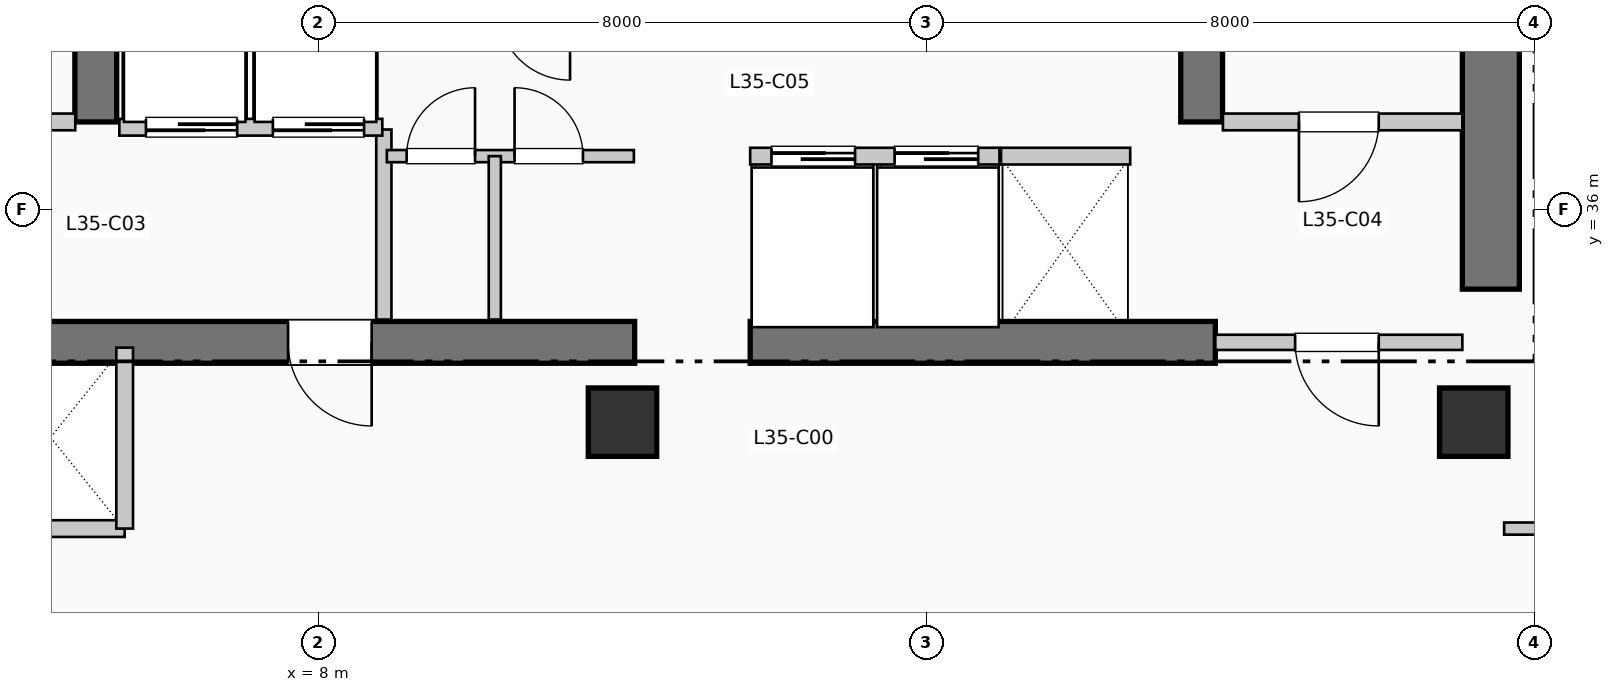
"""IFC4 building model, lengths in metres.
Left out: names, types, materials, properties, quantities, classifications, styles, units other than length and angle.
Written with IfcOpenShell. Run it as: python <this file> out.ifc"""

import sys

from ifc_helpers import new_model, si_unit, direction, frame, frame_2d, origin, origin_2d, place, context, subcontext, project, spatial, rectangle, extrude, element, fill, save


model = new_model("IFC4")
c1 = context("Model", 3, precision=1e-05, world=origin(), true_north=direction((0.0, 1.0)))
c2 = subcontext(c1, "Body", "Model", "MODEL_VIEW")
j1 = project(units=[si_unit("LENGTHUNIT", "METRE"), si_unit("PLANEANGLEUNIT", "RADIAN")], contexts=[c1])
p1 = place(None, origin())
s1 = spatial("IfcSite", under=j1, at=p1, CompositionType="ELEMENT")
p2 = place(p1, origin())
s2 = spatial("IfcBuilding", under=s1, at=p2, CompositionType="ELEMENT")
p3 = place(p2, frame((0.0, 0.0, 146.85)))
s3 = spatial("IfcBuildingStorey", under=s2, at=p3, CompositionType="ELEMENT", Elevation=146.85)
p4 = place(p3, frame((23.425, 34.95, 0.0), z_axis=(0.0, 0.0, 1.0), x_axis=(0.0, 1.0, 0.0)))
e1 = element("IfcWall", 1, at=p4, inside=s3, PredefinedType="SHEAR", context=c2, shape_type="SweptSolid", body=[
    extrude(rectangle(XDim=10.64, YDim=0.75, at=frame_2d((5.32, 0.0))), origin(), (0.0, 0.0, 1.0), 3.96),
])
p5 = place(p3, frame((1.45, 34.25, 0.0), z_axis=(0.0, 0.0, 1.0), x_axis=(1.0, 0.0, 0.0)))
e2 = element("IfcWall", 2, at=p5, inside=s3, PredefinedType="SHEAR", context=c2, shape_type="SweptSolid", body=[
    extrude(rectangle(XDim=10.71, YDim=0.55, at=frame_2d((5.355, 0.0))), origin(), (0.0, 0.0, 1.0), 3.96),
])
p6 = place(p5, frame((7.25, 0.0, 0.0), z_axis=(0.0, 0.0, 1.0), x_axis=(-1.0, 0.0, 0.0)))
e3 = element("IfcOpeningElement", 3, at=p6, cuts=e2, PredefinedType="OPENING", context=c2, shape_type="SweptSolid", body=[
    extrude(rectangle(XDim=1.1, YDim=2.15, at=frame_2d((0.55, 1.075))), frame((0.0, 0.285, 0.0), z_axis=(0.0, -1.0, 0.0), x_axis=(1.0, 0.0, 0.0)), (0.0, 0.0, 1.0), 0.57),
])
p7 = place(p3, frame((13.68, 34.25, 0.0), z_axis=(0.0, 0.0, 1.0), x_axis=(1.0, 0.0, 0.0)))
e4 = element("IfcWall", 4, at=p7, inside=s3, PredefinedType="SHEAR", context=c2, shape_type="SweptSolid", body=[
    extrude(rectangle(XDim=6.12, YDim=0.55, at=frame_2d((3.06, 0.0))), origin(), (0.0, 0.0, 1.0), 3.96),
])
for number, where, z_axis, x_axis in (
    (5, (5.07, 37.15, 0.0), (0.0, 0.0, 1.0), (0.0, 1.0, 0.0)),
    (6, (19.62, 37.15, 0.0), (0.0, 0.0, 1.0), (0.0, 1.0, 0.0)),
):
    element("IfcWall", number, at=place(p3, frame(where, z_axis=z_axis, x_axis=x_axis)), inside=s3, PredefinedType="SHEAR", context=c2, shape_type="SweptSolid", body=[
        extrude(rectangle(XDim=7.89, YDim=0.55, at=frame_2d((3.945, 0.0))), origin(), (0.0, 0.0, 1.0), 3.96),
    ])
for number, where, z_axis, x_axis in (
    (7, (12.0, 33.2, 0.0), (0.0, 0.0, 1.0), (1.0, 0.0, 0.0)),
    (8, (23.2, 33.2, 0.0), (0.0, 0.0, 1.0), (1.0, 0.0, 0.0)),
):
    element("IfcColumn", number, at=place(p3, frame(where, z_axis=z_axis, x_axis=x_axis)), inside=s3, PredefinedType="COLUMN", context=c2, shape_type="SweptSolid", body=[
        extrude(rectangle(XDim=0.9, YDim=0.9, at=origin_2d()), origin(), (0.0, 0.0, 1.0), 3.96),
    ])
p8 = place(p3, frame((1.65, 37.15, 0.0), z_axis=(0.0, 0.0, 1.0), x_axis=(1.0, 0.0, 0.0)))
e9 = element("IfcWall", 9, at=p8, inside=s3, PredefinedType="PARTITIONING", context=c2, shape_type="SweptSolid", body=[
    extrude(rectangle(XDim=3.15, YDim=0.22, at=frame_2d((1.575, 0.0))), origin(), (0.0, 0.0, 1.0), 3.71),
])
p9 = place(p8, frame((2.05, 0.0, 0.0), z_axis=(0.0, 0.0, 1.0), x_axis=(-1.0, 0.0, 0.0)))
e10 = element("IfcOpeningElement", 10, at=p9, cuts=e9, PredefinedType="OPENING", context=c2, shape_type="SweptSolid", body=[
    extrude(rectangle(XDim=1.05, YDim=2.15, at=frame_2d((0.525, 1.075))), frame((0.0, 0.12, 0.0), z_axis=(0.0, -1.0, 0.0), x_axis=(1.0, 0.0, 0.0)), (0.0, 0.0, 1.0), 0.24),
])
p10 = place(p3, frame((8.86, 34.55, 0.0), z_axis=(0.0, 0.0, 1.0), x_axis=(0.0, 1.0, 0.0)))
e11 = element("IfcWall", 11, at=p10, inside=s3, PredefinedType="PARTITIONING", context=c2, shape_type="SweptSolid", body=[
    extrude(rectangle(XDim=2.5, YDim=0.2, at=frame_2d((1.25, 0.0))), origin(), (0.0, 0.0, 1.0), 3.71),
])
p11 = place(p3, frame((19.9, 37.15, 0.0), z_axis=(0.0, 0.0, 1.0), x_axis=(1.0, 0.0, 0.0)))
e12 = element("IfcWall", 12, at=p11, inside=s3, PredefinedType="PARTITIONING", context=c2, shape_type="SweptSolid", body=[
    extrude(rectangle(XDim=3.15, YDim=0.22, at=frame_2d((1.575, 0.0))), origin(), (0.0, 0.0, 1.0), 3.71),
])
p12 = place(p11, frame((2.05, 0.0, 0.0), z_axis=(0.0, 0.0, 1.0), x_axis=(-1.0, 0.0, 0.0)))
e13 = element("IfcOpeningElement", 13, at=p12, cuts=e12, PredefinedType="OPENING", context=c2, shape_type="SweptSolid", body=[
    extrude(rectangle(XDim=1.05, YDim=2.15, at=frame_2d((0.525, 1.075))), frame((0.0, 0.12, 0.0), z_axis=(0.0, -1.0, 0.0), x_axis=(1.0, 0.0, 0.0)), (0.0, 0.0, 1.0), 0.24),
])
p13 = place(p3, frame((19.8, 34.25, 0.0), z_axis=(0.0, 0.0, 1.0), x_axis=(1.0, 0.0, 0.0)))
e14 = element("IfcWall", 14, at=p13, inside=s3, PredefinedType="PARTITIONING", context=c2, shape_type="SweptSolid", body=[
    extrude(rectangle(XDim=3.25, YDim=0.2, at=frame_2d((1.625, 0.0))), origin(), (0.0, 0.0, 1.0), 3.71),
])
p14 = place(p13, frame((2.15, 0.0, 0.0), z_axis=(0.0, 0.0, 1.0), x_axis=(-1.0, 0.0, 0.0)))
e15 = element("IfcOpeningElement", 15, at=p14, cuts=e14, PredefinedType="OPENING", context=c2, shape_type="SweptSolid", body=[
    extrude(rectangle(XDim=1.1, YDim=2.15, at=frame_2d((0.55, 1.075))), frame((0.0, 0.11, 0.0), z_axis=(0.0, -1.0, 0.0), x_axis=(1.0, 0.0, 0.0)), (0.0, 0.0, 1.0), 0.22),
])
p15 = place(p3, frame((5.38, 37.08, 0.0), z_axis=(0.0, 0.0, 1.0), x_axis=(1.0, 0.0, 0.0)))
e16 = element("IfcWall", 16, at=p15, inside=s3, PredefinedType="PARTITIONING", context=c2, shape_type="SweptSolid", body=[
    extrude(rectangle(XDim=3.46, YDim=0.22, at=frame_2d((1.73, 0.0))), origin(), (0.0, 0.0, 1.0), 3.71),
])
p16 = place(p15, frame((1.55, 0.0, 0.0), z_axis=(0.0, 0.0, 1.0), x_axis=(-1.0, 0.0, 0.0)))
e17 = element("IfcOpeningElement", 17, at=p16, cuts=e16, PredefinedType="OPENING", context=c2, shape_type="SweptSolid", body=[
    extrude(rectangle(XDim=1.2, YDim=2.2, at=frame_2d((0.6, 1.1))), frame((0.0, 0.12, 0.0), z_axis=(0.0, -1.0, 0.0), x_axis=(1.0, 0.0, 0.0)), (0.0, 0.0, 1.0), 0.24),
])
p17 = place(p15, frame((3.22, 0.0, 0.0), z_axis=(0.0, 0.0, 1.0), x_axis=(-1.0, 0.0, 0.0)))
e18 = element("IfcOpeningElement", 18, at=p17, cuts=e16, PredefinedType="OPENING", context=c2, shape_type="SweptSolid", body=[
    extrude(rectangle(XDim=1.2, YDim=2.2, at=frame_2d((0.6, 1.1))), frame((0.0, 0.12, 0.0), z_axis=(0.0, -1.0, 0.0), x_axis=(1.0, 0.0, 0.0)), (0.0, 0.0, 1.0), 0.24),
])
p18 = place(p3, frame((1.55, 31.8, 0.0), z_axis=(0.0, 0.0, 1.0), x_axis=(1.0, 0.0, 0.0)))
e19 = element("IfcWall", 19, at=p18, inside=s3, PredefinedType="PARTITIONING", context=c2, shape_type="SweptSolid", body=[
    extrude(rectangle(XDim=3.9, YDim=0.22, at=frame_2d((1.95, 0.0))), origin(), (0.0, 0.0, 1.0), 3.71),
])
p19 = place(p3, frame((5.45, 31.8, 0.0), z_axis=(0.0, 0.0, 1.0), x_axis=(0.0, 1.0, 0.0)))
e20 = element("IfcWall", 20, at=p19, inside=s3, PredefinedType="PARTITIONING", context=c2, shape_type="SweptSolid", body=[
    extrude(rectangle(XDim=2.38, YDim=0.22, at=frame_2d((1.19, 0.0))), origin(), (0.0, 0.0, 1.0), 3.71),
])
p20 = place(p3, frame((8.9, 36.7, 0.0), z_axis=(0.0, 0.0, 1.0), x_axis=(1.0, 0.0, 0.0)))
e21 = element("IfcWall", 21, at=p20, inside=s3, PredefinedType="PARTITIONING", context=c2, shape_type="SweptSolid", body=[
    extrude(rectangle(XDim=3.25, YDim=0.16, at=frame_2d((1.625, 0.0))), origin(), (0.0, 0.0, 1.0), 3.71),
])
p21 = place(p20, frame((0.26, 0.0, 0.0)))
e22 = element("IfcOpeningElement", 22, at=p21, cuts=e21, PredefinedType="OPENING", context=c2, shape_type="SweptSolid", body=[
    extrude(rectangle(XDim=0.9, YDim=2.15, at=frame_2d((0.45, 1.075))), frame((0.0, 0.09, 0.0), z_axis=(0.0, -1.0, 0.0), x_axis=(1.0, 0.0, 0.0)), (0.0, 0.0, 1.0), 0.18),
])
p22 = place(p20, frame((1.68, 0.0, 0.0)))
e23 = element("IfcOpeningElement", 23, at=p22, cuts=e21, PredefinedType="OPENING", context=c2, shape_type="SweptSolid", body=[
    extrude(rectangle(XDim=0.9, YDim=2.15, at=frame_2d((0.45, 1.075))), frame((0.0, 0.09, 0.0), z_axis=(0.0, -1.0, 0.0), x_axis=(1.0, 0.0, 0.0)), (0.0, 0.0, 1.0), 0.18),
])
p23 = place(p3, frame((10.32, 34.55, 0.0), z_axis=(0.0, 0.0, 1.0), x_axis=(0.0, 1.0, 0.0)))
e24 = element("IfcWall", 24, at=p23, inside=s3, PredefinedType="PARTITIONING", context=c2, shape_type="SweptSolid", body=[
    extrude(rectangle(XDim=2.15, YDim=0.16, at=frame_2d((1.075, 0.0))), origin(), (0.0, 0.0, 1.0), 3.71),
])
p24 = place(p3, frame((13.68, 36.7, 0.0), z_axis=(0.0, 0.0, 1.0), x_axis=(1.0, 0.0, 0.0)))
e25 = element("IfcWall", 25, at=p24, inside=s3, PredefinedType="PARTITIONING", context=c2, shape_type="SweptSolid", body=[
    extrude(rectangle(XDim=3.28, YDim=0.22, at=frame_2d((1.64, 0.0))), origin(), (0.0, 0.0, 1.0), 3.71),
])
p25 = place(p24, frame((0.28, 0.0, 0.0)))
e26 = element("IfcOpeningElement", 26, at=p25, cuts=e25, PredefinedType="OPENING", context=c2, shape_type="SweptSolid", body=[
    extrude(rectangle(XDim=1.1, YDim=2.2, at=frame_2d((0.55, 1.1))), frame((0.0, 0.12, 0.0), z_axis=(0.0, -1.0, 0.0), x_axis=(1.0, 0.0, 0.0)), (0.0, 0.0, 1.0), 0.24),
])
p26 = place(p24, frame((1.9, 0.0, 0.0)))
e27 = element("IfcOpeningElement", 27, at=p26, cuts=e25, PredefinedType="OPENING", context=c2, shape_type="SweptSolid", body=[
    extrude(rectangle(XDim=1.1, YDim=2.2, at=frame_2d((0.55, 1.1))), frame((0.0, 0.12, 0.0), z_axis=(0.0, -1.0, 0.0), x_axis=(1.0, 0.0, 0.0)), (0.0, 0.0, 1.0), 0.24),
])
p27 = place(p3, frame((16.98, 36.7, 0.0), z_axis=(0.0, 0.0, 1.0), x_axis=(1.0, 0.0, 0.0)))
e28 = element("IfcWall", 28, at=p27, inside=s3, PredefinedType="PARTITIONING", context=c2, shape_type="SweptSolid", body=[
    extrude(rectangle(XDim=1.7, YDim=0.22, at=frame_2d((0.85, 0.0))), origin(), (0.0, 0.0, 1.0), 3.71),
])
p28 = place(p3, frame((23.6, 31.8, 0.0), z_axis=(0.0, 0.0, 1.0), x_axis=(1.0, 0.0, 0.0)))
e29 = element("IfcWall", 29, at=p28, inside=s3, PredefinedType="PARTITIONING", context=c2, shape_type="SweptSolid", body=[
    extrude(rectangle(XDim=26.41, YDim=0.16, at=frame_2d((13.205, 0.0))), origin(), (0.0, 0.0, 1.0), 3.71),
])
p29 = place(p28, frame((6.156, 0.0, 0.0)))
e30 = element("IfcOpeningElement", 30, at=p29, cuts=e29, PredefinedType="OPENING", context=c2, shape_type="SweptSolid", body=[
    extrude(rectangle(XDim=0.95, YDim=2.15, at=frame_2d((0.475, 1.075))), frame((0.0, 0.09, 0.0), z_axis=(0.0, -1.0, 0.0), x_axis=(1.0, 0.0, 0.0)), (0.0, 0.0, 1.0), 0.18),
])
p30 = place(p28, frame((19.861, 0.0, 0.0)))
e31 = element("IfcOpeningElement", 31, at=p30, cuts=e29, PredefinedType="OPENING", context=c2, shape_type="SweptSolid", body=[
    extrude(rectangle(XDim=0.95, YDim=2.15, at=frame_2d((0.475, 1.075))), frame((0.0, 0.09, 0.0), z_axis=(0.0, -1.0, 0.0), x_axis=(1.0, 0.0, 0.0)), (0.0, 0.0, 1.0), 0.18),
])
p31 = place(p6, origin())
e32 = element("IfcDoor", 32, at=p31, inside=s3, OperationType="SINGLE_SWING_RIGHT", PredefinedType="DOOR", context=c2, shape_type="SweptSolid", body=[
    extrude(rectangle(XDim=1.1, YDim=2.15, at=frame_2d((0.55, 1.075))), frame((0.0, 0.025, 0.0), z_axis=(0.0, -1.0, 0.0), x_axis=(1.0, 0.0, 0.0)), (0.0, 0.0, 1.0), 0.05),
])
fill(e3, e32)
p32 = place(p12, origin())
e33 = element("IfcDoor", 33, at=p32, inside=s3, OperationType="SINGLE_SWING_LEFT", PredefinedType="DOOR", context=c2, shape_type="SweptSolid", body=[
    extrude(rectangle(XDim=1.05, YDim=2.15, at=frame_2d((0.525, 1.075))), frame((0.0, 0.025, 0.0), z_axis=(0.0, -1.0, 0.0), x_axis=(1.0, 0.0, 0.0)), (0.0, 0.0, 1.0), 0.05),
])
fill(e13, e33)
p33 = place(p14, origin())
e34 = element("IfcDoor", 34, at=p33, inside=s3, OperationType="SINGLE_SWING_RIGHT", PredefinedType="DOOR", context=c2, shape_type="SweptSolid", body=[
    extrude(rectangle(XDim=1.1, YDim=2.15, at=frame_2d((0.55, 1.075))), frame((0.0, 0.025, 0.0), z_axis=(0.0, -1.0, 0.0), x_axis=(1.0, 0.0, 0.0)), (0.0, 0.0, 1.0), 0.05),
])
fill(e15, e34)
p34 = place(p16, origin())
e35 = element("IfcDoor", 35, at=p34, inside=s3, OperationType="SLIDING_TO_RIGHT", PredefinedType="DOOR", context=c2, shape_type="SweptSolid", body=[
    extrude(rectangle(XDim=1.2, YDim=2.2, at=frame_2d((0.6, 1.1))), frame((0.0, 0.025, 0.0), z_axis=(0.0, -1.0, 0.0), x_axis=(1.0, 0.0, 0.0)), (0.0, 0.0, 1.0), 0.05),
])
fill(e17, e35)
p35 = place(p17, origin())
e36 = element("IfcDoor", 36, at=p35, inside=s3, OperationType="SLIDING_TO_RIGHT", PredefinedType="DOOR", context=c2, shape_type="SweptSolid", body=[
    extrude(rectangle(XDim=1.2, YDim=2.2, at=frame_2d((0.6, 1.1))), frame((0.0, 0.025, 0.0), z_axis=(0.0, -1.0, 0.0), x_axis=(1.0, 0.0, 0.0)), (0.0, 0.0, 1.0), 0.05),
])
fill(e18, e36)
p36 = place(p21, origin())
e37 = element("IfcDoor", 37, at=p36, inside=s3, OperationType="SINGLE_SWING_RIGHT", PredefinedType="DOOR", context=c2, shape_type="SweptSolid", body=[
    extrude(rectangle(XDim=0.9, YDim=2.15, at=frame_2d((0.45, 1.075))), frame((0.0, 0.025, 0.0), z_axis=(0.0, -1.0, 0.0), x_axis=(1.0, 0.0, 0.0)), (0.0, 0.0, 1.0), 0.05),
])
fill(e22, e37)
p37 = place(p22, origin())
e38 = element("IfcDoor", 38, at=p37, inside=s3, OperationType="SINGLE_SWING_LEFT", PredefinedType="DOOR", context=c2, shape_type="SweptSolid", body=[
    extrude(rectangle(XDim=0.9, YDim=2.15, at=frame_2d((0.45, 1.075))), frame((0.0, 0.025, 0.0), z_axis=(0.0, -1.0, 0.0), x_axis=(1.0, 0.0, 0.0)), (0.0, 0.0, 1.0), 0.05),
])
fill(e23, e38)
p38 = place(p25, origin())
e39 = element("IfcDoor", 39, at=p38, inside=s3, OperationType="SLIDING_TO_RIGHT", PredefinedType="DOOR", context=c2, shape_type="SweptSolid", body=[
    extrude(rectangle(XDim=1.1, YDim=2.2, at=frame_2d((0.55, 1.1))), frame((0.0, 0.025, 0.0), z_axis=(0.0, -1.0, 0.0), x_axis=(1.0, 0.0, 0.0)), (0.0, 0.0, 1.0), 0.05),
])
fill(e26, e39)
p39 = place(p26, origin())
e40 = element("IfcDoor", 40, at=p39, inside=s3, OperationType="SLIDING_TO_RIGHT", PredefinedType="DOOR", context=c2, shape_type="SweptSolid", body=[
    extrude(rectangle(XDim=1.1, YDim=2.2, at=frame_2d((0.55, 1.1))), frame((0.0, 0.025, 0.0), z_axis=(0.0, -1.0, 0.0), x_axis=(1.0, 0.0, 0.0)), (0.0, 0.0, 1.0), 0.05),
])
fill(e27, e40)
save(model, sys.argv[1])
